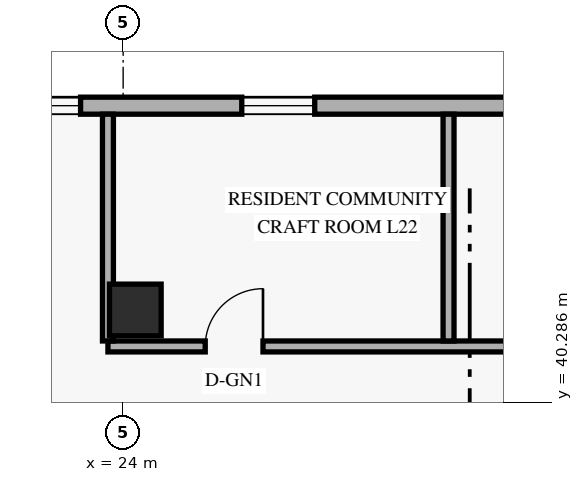
"""IFC4 building model, lengths in metres.
Left out: names, types, materials, properties, quantities, classifications, styles, units other than length and angle.
Written with IfcOpenShell. Run it as: python <this file> out.ifc"""

import sys

from ifc_helpers import new_model, si_unit, direction, frame, frame_2d, origin, origin_2d, place, context, subcontext, project, spatial, rectangle, extrude, element, fill, save


model = new_model("IFC4")
c1 = context("Model", 3, precision=1e-05, world=origin(), true_north=direction((0.0, 1.0)))
c2 = subcontext(c1, "Body", "Model", "MODEL_VIEW")
j1 = project(units=[si_unit("LENGTHUNIT", "METRE"), si_unit("PLANEANGLEUNIT", "RADIAN")], contexts=[c1])
p1 = place(None, origin())
s1 = spatial("IfcSite", under=j1, at=p1, CompositionType="ELEMENT")
p2 = place(p1, origin())
s2 = spatial("IfcBuilding", under=s1, at=p2, CompositionType="ELEMENT")
p3 = place(p2, frame((0.0, 0.0, 87.6)))
s3 = spatial("IfcBuildingStorey", under=s2, at=p3, CompositionType="ELEMENT", Elevation=87.6)
p4 = place(p3, frame((24.2, 41.8, 0.0), z_axis=(0.0, 0.0, 1.0), x_axis=(1.0, 0.0, 0.0)))
e1 = element("IfcColumn", 1, at=p4, inside=s3, PredefinedType="COLUMN", context=c2, shape_type="SweptSolid", body=[
    extrude(rectangle(XDim=0.85, YDim=0.85, at=origin_2d()), origin(), (0.0, 0.0, 1.0), 3.6),
])
p5 = place(p3, frame((49.98, 45.16, 0.0), z_axis=(0.0, 0.0, 1.0), x_axis=(-1.0, 0.0, 0.0)))
e2 = element("IfcWall", 2, at=p5, inside=s3, PredefinedType="SOLIDWALL", context=c2, shape_type="SweptSolid", body=[
    extrude(rectangle(XDim=36.56, YDim=0.28, at=frame_2d((18.28, 0.0))), origin(), (0.0, 0.0, 1.0), 3.36),
])
p6 = place(p5, frame((31.215, 0.0, 0.85)))
e3 = element("IfcOpeningElement", 3, at=p6, cuts=e2, PredefinedType="OPENING", context=c2, shape_type="SweptSolid", body=[
    extrude(rectangle(XDim=1.2, YDim=1.5, at=frame_2d((0.6, 0.75))), frame((0.0, 0.15, 0.0), z_axis=(0.0, -1.0, 0.0), x_axis=(1.0, 0.0, 0.0)), (0.0, 0.0, 1.0), 0.3),
])
p7 = place(p5, frame((26.68, 0.0, 0.85)))
e4 = element("IfcOpeningElement", 4, at=p7, cuts=e2, PredefinedType="OPENING", context=c2, shape_type="SweptSolid", body=[
    extrude(rectangle(XDim=1.2, YDim=1.5, at=frame_2d((0.6, 0.75))), frame((0.0, 0.15, 0.0), z_axis=(0.0, -1.0, 0.0), x_axis=(1.0, 0.0, 0.0)), (0.0, 0.0, 1.0), 0.3),
])
p8 = place(p5, frame((22.829, 0.0, 0.85)))
e5 = element("IfcOpeningElement", 5, at=p8, cuts=e2, PredefinedType="OPENING", context=c2, shape_type="SweptSolid", body=[
    extrude(rectangle(XDim=1.2, YDim=1.5, at=frame_2d((0.6, 0.75))), frame((0.0, 0.15, 0.0), z_axis=(0.0, -1.0, 0.0), x_axis=(1.0, 0.0, 0.0)), (0.0, 0.0, 1.0), 0.3),
])
p9 = place(p5, frame((16.994, 0.0, 0.85)))
e6 = element("IfcOpeningElement", 6, at=p9, cuts=e2, PredefinedType="OPENING", context=c2, shape_type="SweptSolid", body=[
    extrude(rectangle(XDim=1.2, YDim=1.5, at=frame_2d((0.6, 0.75))), frame((0.0, 0.15, 0.0), z_axis=(0.0, -1.0, 0.0), x_axis=(1.0, 0.0, 0.0)), (0.0, 0.0, 1.0), 0.3),
])
p10 = place(p5, frame((12.895, 0.0, 0.85)))
e7 = element("IfcOpeningElement", 7, at=p10, cuts=e2, PredefinedType="OPENING", context=c2, shape_type="SweptSolid", body=[
    extrude(rectangle(XDim=1.2, YDim=1.5, at=frame_2d((0.6, 0.75))), frame((0.0, 0.15, 0.0), z_axis=(0.0, -1.0, 0.0), x_axis=(1.0, 0.0, 0.0)), (0.0, 0.0, 1.0), 0.3),
])
p11 = place(p5, frame((7.833, 0.0, 0.85)))
e8 = element("IfcOpeningElement", 8, at=p11, cuts=e2, PredefinedType="OPENING", context=c2, shape_type="SweptSolid", body=[
    extrude(rectangle(XDim=1.2, YDim=1.5, at=frame_2d((0.6, 0.75))), frame((0.0, 0.15, 0.0), z_axis=(0.0, -1.0, 0.0), x_axis=(1.0, 0.0, 0.0)), (0.0, 0.0, 1.0), 0.3),
])
p12 = place(p5, frame((1.617, 0.0, 0.85)))
e9 = element("IfcOpeningElement", 9, at=p12, cuts=e2, PredefinedType="OPENING", context=c2, shape_type="SweptSolid", body=[
    extrude(rectangle(XDim=1.2, YDim=1.5, at=frame_2d((0.6, 0.75))), frame((0.0, 0.15, 0.0), z_axis=(0.0, -1.0, 0.0), x_axis=(1.0, 0.0, 0.0)), (0.0, 0.0, 1.0), 0.3),
])
p13 = place(p3, frame((23.75, 41.2, 0.0), z_axis=(0.0, 0.0, 1.0), x_axis=(1.0, 0.0, 0.0)))
e10 = element("IfcWall", 10, at=p13, inside=s3, PredefinedType="STANDARD", context=c2, shape_type="SweptSolid", body=[
    extrude(rectangle(XDim=11.67, YDim=0.18, at=frame_2d((5.835, 0.0))), origin(), (0.0, 0.0, 1.0), 2.731),
])
p14 = place(p13, frame((1.6, 0.0, 0.0)))
e11 = element("IfcOpeningElement", 11, at=p14, cuts=e10, PredefinedType="OPENING", context=c2, shape_type="SweptSolid", body=[
    extrude(rectangle(XDim=0.95, YDim=2.15, at=frame_2d((0.475, 1.075))), frame((0.0, 0.1, 0.0), z_axis=(0.0, -1.0, 0.0), x_axis=(1.0, 0.0, 0.0)), (0.0, 0.0, 1.0), 0.2),
])
p15 = place(p13, frame((8.176, 0.0, 0.0)))
e12 = element("IfcOpeningElement", 12, at=p15, cuts=e10, PredefinedType="OPENING", context=c2, shape_type="SweptSolid", body=[
    extrude(rectangle(XDim=0.92, YDim=2.15, at=frame_2d((0.46, 1.075))), frame((0.0, 0.1, 0.0), z_axis=(0.0, -1.0, 0.0), x_axis=(1.0, 0.0, 0.0)), (0.0, 0.0, 1.0), 0.2),
])
for number, where, z_axis, x_axis in (
    (13, (23.75, 41.29, 0.0), (0.0, 0.0, 1.0), (0.0, 1.0, 0.0)),
    (14, (29.352, 41.29, 0.0), (0.0, 0.0, 1.0), (0.0, 1.0, 0.0)),
):
    element("IfcWall", number, at=place(p3, frame(where, z_axis=z_axis, x_axis=x_axis)), inside=s3, PredefinedType="PARTITIONING", context=c2, shape_type="SweptSolid", body=[
        extrude(rectangle(XDim=3.73, YDim=0.18, at=frame_2d((1.865, 0.0))), origin(), (0.0, 0.0, 1.0), 2.809),
    ])
p16 = place(p7, origin())
e15 = element("IfcWindow", 15, at=p16, inside=s3, PartitioningType="SINGLE_PANEL", PredefinedType="WINDOW", context=c2, shape_type="SweptSolid", body=[
    extrude(rectangle(XDim=1.2, YDim=1.5, at=frame_2d((0.6, 0.75))), frame((0.0, 0.03, 0.0), z_axis=(0.0, -1.0, 0.0), x_axis=(1.0, 0.0, 0.0)), (0.0, 0.0, 1.0), 0.06),
])
fill(e4, e15)
p17 = place(p8, origin())
e16 = element("IfcWindow", 16, at=p17, inside=s3, PartitioningType="SINGLE_PANEL", PredefinedType="WINDOW", context=c2, shape_type="SweptSolid", body=[
    extrude(rectangle(XDim=1.2, YDim=1.5, at=frame_2d((0.6, 0.75))), frame((0.0, 0.03, 0.0), z_axis=(0.0, -1.0, 0.0), x_axis=(1.0, 0.0, 0.0)), (0.0, 0.0, 1.0), 0.06),
])
fill(e5, e16)
p18 = place(p14, origin())
e17 = element("IfcDoor", 17, at=p18, inside=s3, OperationType="SINGLE_SWING_RIGHT", PredefinedType="DOOR", context=c2, shape_type="SweptSolid", body=[
    extrude(rectangle(XDim=0.95, YDim=2.15, at=frame_2d((0.475, 1.075))), frame((0.0, 0.025, 0.0), z_axis=(0.0, -1.0, 0.0), x_axis=(1.0, 0.0, 0.0)), (0.0, 0.0, 1.0), 0.05),
])
fill(e11, e17)
save(model, sys.argv[1])
